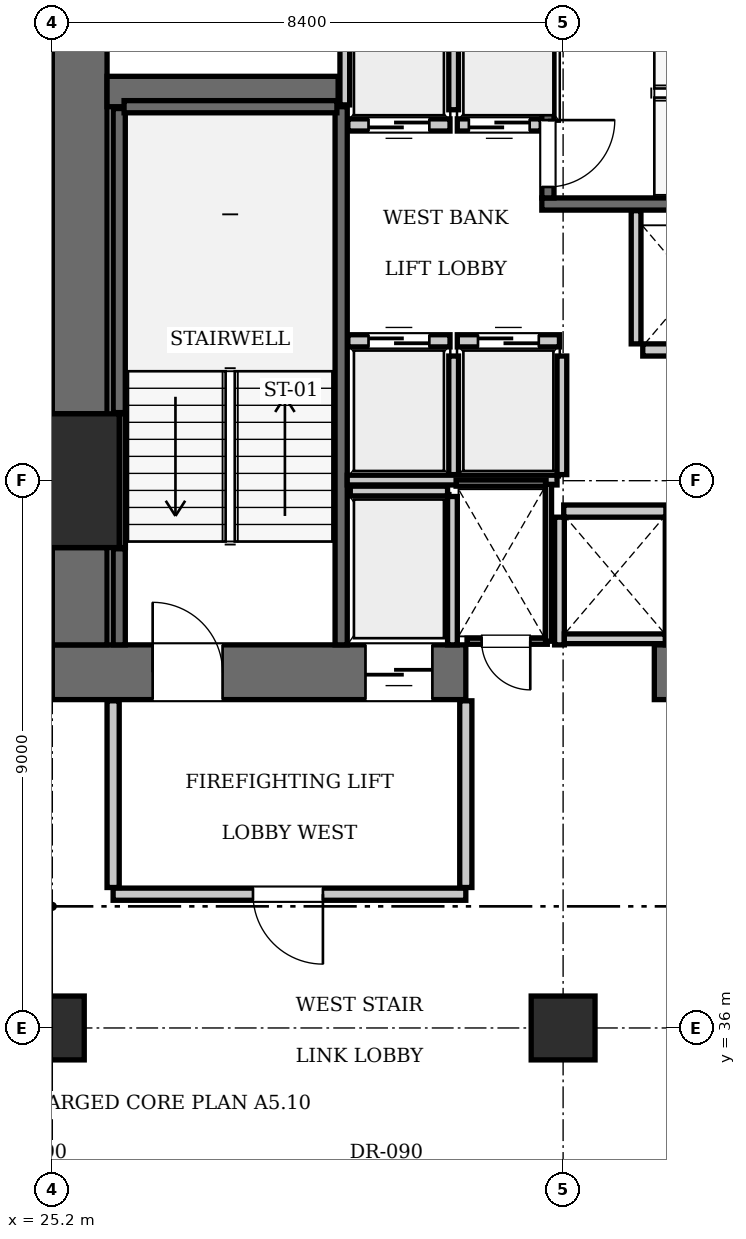
"""IFC4 building model, lengths in metres.
Left out: names, types, materials, properties, quantities, classifications, styles, units other than length and angle.
Written with IfcOpenShell. Run it as: python <this file> out.ifc"""

import sys

from ifc_helpers import new_model, si_unit, direction, frame, frame_2d, origin, origin_2d, place, context, subcontext, project, spatial, rectangle, extrude, element, fill, save


model = new_model("IFC4")
c1 = context("Model", 3, precision=1e-05, world=origin(), true_north=direction((0.0, 1.0)))
c2 = subcontext(c1, "Body", "Model", "MODEL_VIEW")
j1 = project(units=[si_unit("LENGTHUNIT", "METRE"), si_unit("PLANEANGLEUNIT", "RADIAN")], contexts=[c1])
p1 = place(None, origin())
s1 = spatial("IfcSite", under=j1, at=p1, CompositionType="ELEMENT")
p2 = place(p1, origin())
s2 = spatial("IfcBuilding", under=s1, at=p2, CompositionType="ELEMENT")
p3 = place(p2, frame((0.0, 0.0, 69.3)))
s3 = spatial("IfcBuildingStorey", under=s2, at=p3, CompositionType="ELEMENT", Elevation=69.3)
p4 = place(p3, frame((25.2, 45.0, 0.0), z_axis=(0.0, 0.0, 1.0), x_axis=(1.0, 0.0, 0.0)))
e1 = element("IfcColumn", 1, at=p4, inside=s3, PredefinedType="COLUMN", context=c2, shape_type="SweptSolid", body=[
    extrude(rectangle(XDim=2.2, YDim=2.2, at=origin_2d()), origin(), (0.0, 0.0, 1.0), 3.85),
])
p5 = place(p3, frame((25.2, 41.85, 0.0), z_axis=(0.0, 0.0, 1.0), x_axis=(1.0, 0.0, 0.0)))
e2 = element("IfcWall", 2, at=p5, inside=s3, PredefinedType="SHEAR", context=c2, shape_type="SweptSolid", body=[
    extrude(rectangle(XDim=6.8, YDim=0.9, at=frame_2d((3.4, 0.0))), origin(), (0.0, 0.0, 1.0), 3.85),
])
p6 = place(p5, frame((1.65, 0.0, 0.0)))
e3 = element("IfcOpeningElement", 3, at=p6, cuts=e2, PredefinedType="OPENING", context=c2, shape_type="SweptSolid", body=[
    extrude(rectangle(XDim=1.15, YDim=2.15, at=frame_2d((0.575, 1.075))), frame((0.0, 0.46, 0.0), z_axis=(0.0, -1.0, 0.0), x_axis=(1.0, 0.0, 0.0)), (0.0, 0.0, 1.0), 0.92),
])
p7 = place(p5, frame((5.15, 0.0, 0.0)))
e4 = element("IfcOpeningElement", 4, at=p7, cuts=e2, PredefinedType="OPENING", context=c2, shape_type="SweptSolid", body=[
    extrude(rectangle(XDim=1.1, YDim=2.2, at=frame_2d((0.55, 1.1))), frame((0.0, 0.46, 0.0), z_axis=(0.0, -1.0, 0.0), x_axis=(1.0, 0.0, 0.0)), (0.0, 0.0, 1.0), 0.92),
])
p8 = place(p3, frame((35.1, 41.85, 0.0), z_axis=(0.0, 0.0, 1.0), x_axis=(1.0, 0.0, 0.0)))
e5 = element("IfcWall", 5, at=p8, inside=s3, PredefinedType="SHEAR", context=c2, shape_type="SweptSolid", body=[
    extrude(rectangle(XDim=5.4, YDim=0.9, at=frame_2d((2.7, 0.0))), origin(), (0.0, 0.0, 1.0), 3.85),
])
p9 = place(p3, frame((25.65, 42.3, 0.0), z_axis=(0.0, 0.0, 1.0), x_axis=(0.0, 1.0, 0.0)))
e6 = element("IfcWall", 6, at=p9, inside=s3, PredefinedType="SHEAR", context=c2, shape_type="SweptSolid", body=[
    extrude(rectangle(XDim=1.6, YDim=0.9, at=frame_2d((0.8, 0.0))), origin(), (0.0, 0.0, 1.0), 3.85),
])
p10 = place(p3, frame((25.65, 46.1, 0.0), z_axis=(0.0, 0.0, 1.0), x_axis=(0.0, 1.0, 0.0)))
e7 = element("IfcWall", 7, at=p10, inside=s3, PredefinedType="SHEAR", context=c2, shape_type="SweptSolid", body=[
    extrude(rectangle(XDim=7.0, YDim=0.9, at=frame_2d((3.5, 0.0))), origin(), (0.0, 0.0, 1.0), 3.85),
])
p11 = place(p3, frame((26.1, 51.4, 0.0), z_axis=(0.0, 0.0, 1.0), x_axis=(1.0, 0.0, 0.0)))
e8 = element("IfcWall", 8, at=p11, inside=s3, PredefinedType="SHEAR", context=c2, shape_type="SweptSolid", body=[
    extrude(rectangle(XDim=3.8, YDim=0.5, at=frame_2d((1.9, 0.0))), origin(), (0.0, 0.0, 1.0), 3.85),
])
for number, where, z_axis, x_axis in (
    (9, (25.2, 36.0, 0.0), (0.0, 0.0, 1.0), (1.0, 0.0, 0.0)),
    (10, (33.6, 36.0, 0.0), (0.0, 0.0, 1.0), (1.0, 0.0, 0.0)),
):
    element("IfcColumn", number, at=place(p3, frame(where, z_axis=z_axis, x_axis=x_axis)), inside=s3, PredefinedType="COLUMN", context=c2, shape_type="SweptSolid", body=[
        extrude(rectangle(XDim=1.05, YDim=1.05, at=origin_2d()), origin(), (0.0, 0.0, 1.0), 3.85),
    ])
p12 = place(p3, frame((29.95, 42.3, 0.0), z_axis=(0.0, 0.0, 1.0), x_axis=(0.0, 1.0, 0.0)))
e11 = element("IfcWall", 11, at=p12, inside=s3, PredefinedType="SOLIDWALL", context=c2, shape_type="SweptSolid", body=[
    extrude(rectangle(XDim=8.85, YDim=0.2, at=frame_2d((4.425, 0.0))), origin(), (0.0, 0.0, 1.0), 3.61),
])
p13 = place(p3, frame((26.3, 42.3, 0.0), z_axis=(0.0, 0.0, 1.0), x_axis=(0.0, 1.0, 0.0)))
e12 = element("IfcWall", 12, at=p13, inside=s3, PredefinedType="SOLIDWALL", context=c2, shape_type="SweptSolid", body=[
    extrude(rectangle(XDim=1.58, YDim=0.2, at=frame_2d((0.79, 0.0))), origin(), (0.0, 0.0, 1.0), 3.61),
])
p14 = place(p3, frame((26.3, 46.12, 0.0), z_axis=(0.0, 0.0, 1.0), x_axis=(0.0, 1.0, 0.0)))
e13 = element("IfcWall", 13, at=p14, inside=s3, PredefinedType="SOLIDWALL", context=c2, shape_type="SweptSolid", body=[
    extrude(rectangle(XDim=5.0, YDim=0.2, at=frame_2d((2.5, 0.0))), origin(), (0.0, 0.0, 1.0), 3.61),
])
p15 = place(p3, frame((26.38, 51.15, 0.0), z_axis=(0.0, 0.0, 1.0), x_axis=(1.0, 0.0, 0.0)))
e14 = element("IfcWall", 14, at=p15, inside=s3, PredefinedType="SOLIDWALL", context=c2, shape_type="SweptSolid", body=[
    extrude(rectangle(XDim=3.5, YDim=0.2, at=frame_2d((1.75, 0.0))), origin(), (0.0, 0.0, 1.0), 3.61),
])
p16 = place(p3, frame((26.352, 43.9, 0.0), z_axis=(0.0, 0.0, 1.0), x_axis=(0.0, 1.0, 0.0)))
e15 = element("IfcWall", 15, at=p16, inside=s3, PredefinedType="SOLIDWALL", context=c2, shape_type="SweptSolid", body=[
    extrude(rectangle(XDim=2.2, YDim=0.1, at=frame_2d((1.1, 0.0))), origin(), (0.0, 0.0, 1.0), 3.61),
])
p17 = place(p3, frame((33.25, 49.55, 0.0), z_axis=(0.0, 0.0, 1.0), x_axis=(1.0, 0.0, 0.0)))
e16 = element("IfcWall", 16, at=p17, inside=s3, PredefinedType="SOLIDWALL", context=c2, shape_type="SweptSolid", body=[
    extrude(rectangle(XDim=9.1, YDim=0.2, at=frame_2d((4.55, 0.0))), origin(), (0.0, 0.0, 1.0), 3.61),
])
p18 = place(p3, frame((33.35, 49.65, 0.0), z_axis=(0.0, 0.0, 1.0), x_axis=(0.0, 1.0, 0.0)))
e17 = element("IfcWall", 17, at=p18, inside=s3, PredefinedType="SOLIDWALL", context=c2, shape_type="SweptSolid", body=[
    extrude(rectangle(XDim=3.45, YDim=0.2, at=frame_2d((1.725, 0.0))), origin(), (0.0, 0.0, 1.0), 3.61),
])
p19 = place(p18, frame((0.18, 0.0, 0.0)))
e18 = element("IfcOpeningElement", 18, at=p19, cuts=e17, PredefinedType="OPENING", context=c2, shape_type="SweptSolid", body=[
    extrude(rectangle(XDim=1.1, YDim=2.15, at=frame_2d((0.55, 1.075))), frame((0.0, 0.11, 0.0), z_axis=(0.0, -1.0, 0.0), x_axis=(1.0, 0.0, 0.0)), (0.0, 0.0, 1.0), 0.22),
])
p20 = place(p3, frame((30.06, 47.3, 0.0), z_axis=(0.0, 0.0, 1.0), x_axis=(1.0, 0.0, 0.0)))
e19 = element("IfcWall", 19, at=p20, inside=s3, PredefinedType="SOLIDWALL", context=c2, shape_type="SweptSolid", body=[
    extrude(rectangle(XDim=1.68, YDim=0.2, at=frame_2d((0.84, 0.0))), origin(), (0.0, 0.0, 1.0), 3.61),
])
p21 = place(p20, frame((0.34, 0.0, 0.0)))
e20 = element("IfcOpeningElement", 20, at=p21, cuts=e19, PredefinedType="OPENING", context=c2, shape_type="SweptSolid", body=[
    extrude(rectangle(XDim=1.0, YDim=2.15, at=frame_2d((0.5, 1.075))), frame((0.0, 0.11, 0.0), z_axis=(0.0, -1.0, 0.0), x_axis=(1.0, 0.0, 0.0)), (0.0, 0.0, 1.0), 0.22),
])
p22 = place(p3, frame((31.86, 47.3, 0.0), z_axis=(0.0, 0.0, 1.0), x_axis=(1.0, 0.0, 0.0)))
e21 = element("IfcWall", 21, at=p22, inside=s3, PredefinedType="SOLIDWALL", context=c2, shape_type="SweptSolid", body=[
    extrude(rectangle(XDim=1.68, YDim=0.2, at=frame_2d((0.84, 0.0))), origin(), (0.0, 0.0, 1.0), 3.61),
])
p23 = place(p22, frame((0.34, 0.0, 0.0)))
e22 = element("IfcOpeningElement", 22, at=p23, cuts=e21, PredefinedType="OPENING", context=c2, shape_type="SweptSolid", body=[
    extrude(rectangle(XDim=1.0, YDim=2.15, at=frame_2d((0.5, 1.075))), frame((0.0, 0.11, 0.0), z_axis=(0.0, -1.0, 0.0), x_axis=(1.0, 0.0, 0.0)), (0.0, 0.0, 1.0), 0.22),
])
p24 = place(p3, frame((30.06, 50.85, 0.0), z_axis=(0.0, 0.0, 1.0), x_axis=(1.0, 0.0, 0.0)))
e23 = element("IfcWall", 23, at=p24, inside=s3, PredefinedType="SOLIDWALL", context=c2, shape_type="SweptSolid", body=[
    extrude(rectangle(XDim=1.68, YDim=0.2, at=frame_2d((0.84, 0.0))), origin(), (0.0, 0.0, 1.0), 3.61),
])
p25 = place(p24, frame((0.34, 0.0, 0.0)))
e24 = element("IfcOpeningElement", 24, at=p25, cuts=e23, PredefinedType="OPENING", context=c2, shape_type="SweptSolid", body=[
    extrude(rectangle(XDim=1.0, YDim=2.15, at=frame_2d((0.5, 1.075))), frame((0.0, 0.11, 0.0), z_axis=(0.0, -1.0, 0.0), x_axis=(1.0, 0.0, 0.0)), (0.0, 0.0, 1.0), 0.22),
])
p26 = place(p3, frame((31.86, 50.85, 0.0), z_axis=(0.0, 0.0, 1.0), x_axis=(1.0, 0.0, 0.0)))
e25 = element("IfcWall", 25, at=p26, inside=s3, PredefinedType="SOLIDWALL", context=c2, shape_type="SweptSolid", body=[
    extrude(rectangle(XDim=1.38, YDim=0.2, at=frame_2d((0.69, 0.0))), origin(), (0.0, 0.0, 1.0), 3.61),
])
p27 = place(p26, frame((0.19, 0.0, 0.0)))
e26 = element("IfcOpeningElement", 26, at=p27, cuts=e25, PredefinedType="OPENING", context=c2, shape_type="SweptSolid", body=[
    extrude(rectangle(XDim=1.0, YDim=2.15, at=frame_2d((0.5, 1.075))), frame((0.0, 0.11, 0.0), z_axis=(0.0, -1.0, 0.0), x_axis=(1.0, 0.0, 0.0)), (0.0, 0.0, 1.0), 0.22),
])
p28 = place(p3, frame((34.91, 47.15, 0.0), z_axis=(0.0, 0.0, 1.0), x_axis=(1.0, 0.0, 0.0)))
e27 = element("IfcWall", 27, at=p28, inside=s3, PredefinedType="SOLIDWALL", context=c2, shape_type="SweptSolid", body=[
    extrude(rectangle(XDim=1.68, YDim=0.2, at=frame_2d((0.84, 0.0))), origin(), (0.0, 0.0, 1.0), 3.61),
])
p29 = place(p3, frame((33.61, 44.5, 0.0), z_axis=(0.0, 0.0, 1.0), x_axis=(1.0, 0.0, 0.0)))
e28 = element("IfcWall", 28, at=p29, inside=s3, PredefinedType="SOLIDWALL", context=c2, shape_type="SweptSolid", body=[
    extrude(rectangle(XDim=1.68, YDim=0.2, at=frame_2d((0.84, 0.0))), origin(), (0.0, 0.0, 1.0), 3.61),
])
p30 = place(p3, frame((30.1, 44.83, 0.0), z_axis=(0.0, 0.0, 1.0), x_axis=(1.0, 0.0, 0.0)))
e29 = element("IfcWall", 29, at=p30, inside=s3, PredefinedType="SOLIDWALL", context=c2, shape_type="SweptSolid", body=[
    extrude(rectangle(XDim=1.6, YDim=0.16, at=frame_2d((0.8, 0.0))), origin(), (0.0, 0.0, 1.0), 3.61),
])
p31 = place(p3, frame((31.78, 42.3, 0.0), z_axis=(0.0, 0.0, 1.0), x_axis=(0.0, 1.0, 0.0)))
e30 = element("IfcWall", 30, at=p31, inside=s3, PredefinedType="SOLIDWALL", context=c2, shape_type="SweptSolid", body=[
    extrude(rectangle(XDim=2.44, YDim=0.16, at=frame_2d((1.22, 0.0))), origin(), (0.0, 0.0, 1.0), 3.61),
])
for number, where, z_axis, x_axis in (
    (31, (31.8, 45.1, 0.0), (0.0, 0.0, 1.0), (0.0, 1.0, 0.0)),
    (32, (33.58, 45.1, 0.0), (0.0, 0.0, 1.0), (0.0, 1.0, 0.0)),
):
    element("IfcWall", number, at=place(p3, frame(where, z_axis=z_axis, x_axis=x_axis)), inside=s3, PredefinedType="SOLIDWALL", context=c2, shape_type="SweptSolid", body=[
        extrude(rectangle(XDim=1.95, YDim=0.16, at=frame_2d((0.975, 0.0))), origin(), (0.0, 0.0, 1.0), 3.61),
    ])
p32 = place(p3, frame((30.05, 45.01, 0.0), z_axis=(0.0, 0.0, 1.0), x_axis=(1.0, 0.0, 0.0)))
e33 = element("IfcWall", 33, at=p32, inside=s3, PredefinedType="SOLIDWALL", context=c2, shape_type="SweptSolid", body=[
    extrude(rectangle(XDim=3.45, YDim=0.16, at=frame_2d((1.725, 0.0))), origin(), (0.0, 0.0, 1.0), 3.61),
])
p33 = place(p3, frame((30.01, 51.18, 0.0), z_axis=(0.0, 0.0, 1.0), x_axis=(0.0, 1.0, 0.0)))
e34 = element("IfcWall", 34, at=p33, inside=s3, PredefinedType="SOLIDWALL", context=c2, shape_type="SweptSolid", body=[
    extrude(rectangle(XDim=1.92, YDim=0.16, at=frame_2d((0.96, 0.0))), origin(), (0.0, 0.0, 1.0), 3.61),
])
p34 = place(p3, frame((31.8, 51.1, 0.0), z_axis=(0.0, 0.0, 1.0), x_axis=(0.0, 1.0, 0.0)))
e35 = element("IfcWall", 35, at=p34, inside=s3, PredefinedType="SOLIDWALL", context=c2, shape_type="SweptSolid", body=[
    extrude(rectangle(XDim=2.0, YDim=0.16, at=frame_2d((1.0, 0.0))), origin(), (0.0, 0.0, 1.0), 3.61),
])
p35 = place(p3, frame((34.8, 47.25, 0.0), z_axis=(0.0, 0.0, 1.0), x_axis=(0.0, 1.0, 0.0)))
e36 = element("IfcWall", 36, at=p35, inside=s3, PredefinedType="SOLIDWALL", context=c2, shape_type="SweptSolid", body=[
    extrude(rectangle(XDim=2.19, YDim=0.16, at=frame_2d((1.095, 0.0))), origin(), (0.0, 0.0, 1.0), 3.61),
])
for number, where, z_axis, x_axis in (
    (37, (33.54, 42.3, 0.0), (0.0, 0.0, 1.0), (0.0, 1.0, 0.0)),
    (38, (35.36, 42.3, 0.0), (0.0, 0.0, 1.0), (0.0, 1.0, 0.0)),
):
    element("IfcWall", number, at=place(p3, frame(where, z_axis=z_axis, x_axis=x_axis)), inside=s3, PredefinedType="SOLIDWALL", context=c2, shape_type="SweptSolid", body=[
        extrude(rectangle(XDim=2.1, YDim=0.16, at=frame_2d((1.05, 0.0))), origin(), (0.0, 0.0, 1.0), 3.61),
    ])
p36 = place(p3, frame((33.62, 42.4, 0.0), z_axis=(0.0, 0.0, 1.0), x_axis=(1.0, 0.0, 0.0)))
e39 = element("IfcWall", 39, at=p36, inside=s3, PredefinedType="SOLIDWALL", context=c2, shape_type="SweptSolid", body=[
    extrude(rectangle(XDim=1.66, YDim=0.16, at=frame_2d((0.83, 0.0))), origin(), (0.0, 0.0, 1.0), 3.61),
])
p37 = place(p3, frame((26.2, 38.2, 0.0), z_axis=(0.0, 0.0, 1.0), x_axis=(1.0, 0.0, 0.0)))
e40 = element("IfcWall", 40, at=p37, inside=s3, PredefinedType="PARTITIONING", context=c2, shape_type="SweptSolid", body=[
    extrude(rectangle(XDim=5.8, YDim=0.2, at=frame_2d((2.9, 0.0))), origin(), (0.0, 0.0, 1.0), 3.61),
])
p38 = place(p37, frame((2.3, 0.0, 0.0)))
e41 = element("IfcOpeningElement", 41, at=p38, cuts=e40, PredefinedType="OPENING", context=c2, shape_type="SweptSolid", body=[
    extrude(rectangle(XDim=1.15, YDim=2.15, at=frame_2d((0.575, 1.075))), frame((0.0, 0.11, 0.0), z_axis=(0.0, -1.0, 0.0), x_axis=(1.0, 0.0, 0.0)), (0.0, 0.0, 1.0), 0.22),
])
for number, where, z_axis, x_axis in (
    (42, (26.2, 38.31, 0.0), (0.0, 0.0, 1.0), (0.0, 1.0, 0.0)),
    (43, (32.0, 38.31, 0.0), (0.0, 0.0, 1.0), (0.0, 1.0, 0.0)),
):
    element("IfcWall", number, at=place(p3, frame(where, z_axis=z_axis, x_axis=x_axis)), inside=s3, PredefinedType="PARTITIONING", context=c2, shape_type="SweptSolid", body=[
        extrude(rectangle(XDim=3.07, YDim=0.2, at=frame_2d((1.535, 0.0))), origin(), (0.0, 0.0, 1.0), 3.61),
    ])
p39 = place(p3, frame((32.02, 42.36, 0.0), z_axis=(0.0, 0.0, 1.0), x_axis=(1.0, 0.0, 0.0)))
e44 = element("IfcWall", 44, at=p39, inside=s3, PredefinedType="PARTITIONING", context=c2, shape_type="SweptSolid", body=[
    extrude(rectangle(XDim=1.32, YDim=0.1, at=frame_2d((0.66, 0.0))), origin(), (0.0, 0.0, 1.0), 3.61),
])
p40 = place(p39, frame((0.24, 0.0, 0.0)))
e45 = element("IfcOpeningElement", 45, at=p40, cuts=e44, PredefinedType="OPENING", context=c2, shape_type="SweptSolid", body=[
    extrude(rectangle(XDim=0.8, YDim=2.05, at=frame_2d((0.4, 1.025))), frame((0.0, 0.06, 0.0), z_axis=(0.0, -1.0, 0.0), x_axis=(1.0, 0.0, 0.0)), (0.0, 0.0, 1.0), 0.12),
])
p41 = place(p3, frame((31.84, 44.96, 0.0), z_axis=(0.0, 0.0, 1.0), x_axis=(1.0, 0.0, 0.0)))
e46 = element("IfcWall", 46, at=p41, inside=s3, PredefinedType="PARTITIONING", context=c2, shape_type="SweptSolid", body=[
    extrude(rectangle(XDim=1.48, YDim=0.1, at=frame_2d((0.74, 0.0))), origin(), (0.0, 0.0, 1.0), 3.61),
])
p42 = place(p3, frame((33.36, 42.36, 0.0), z_axis=(0.0, 0.0, 1.0), x_axis=(0.0, 1.0, 0.0)))
e47 = element("IfcWall", 47, at=p42, inside=s3, PredefinedType="PARTITIONING", context=c2, shape_type="SweptSolid", body=[
    extrude(rectangle(XDim=2.58, YDim=0.1, at=frame_2d((1.29, 0.0))), origin(), (0.0, 0.0, 1.0), 3.61),
])
p43 = place(p6, origin())
e48 = element("IfcDoor", 48, at=p43, inside=s3, OperationType="SINGLE_SWING_LEFT", PredefinedType="DOOR", context=c2, shape_type="SweptSolid", body=[
    extrude(rectangle(XDim=1.15, YDim=2.15, at=frame_2d((0.575, 1.075))), frame((0.0, 0.025, 0.0), z_axis=(0.0, -1.0, 0.0), x_axis=(1.0, 0.0, 0.0)), (0.0, 0.0, 1.0), 0.05),
])
fill(e3, e48)
p44 = place(p19, frame((1.1, 0.0, 0.0), z_axis=(0.0, 0.0, 1.0), x_axis=(-1.0, 0.0, 0.0)))
e49 = element("IfcDoor", 49, at=p44, inside=s3, OperationType="SINGLE_SWING_LEFT", PredefinedType="DOOR", context=c2, shape_type="SweptSolid", body=[
    extrude(rectangle(XDim=1.1, YDim=2.15, at=frame_2d((0.55, 1.075))), frame((0.0, 0.025, 0.0), z_axis=(0.0, -1.0, 0.0), x_axis=(1.0, 0.0, 0.0)), (0.0, 0.0, 1.0), 0.05),
])
fill(e18, e49)
p45 = place(p21, origin())
e50 = element("IfcDoor", 50, at=p45, inside=s3, OperationType="SLIDING_TO_LEFT", PredefinedType="DOOR", context=c2, shape_type="SweptSolid", body=[
    extrude(rectangle(XDim=1.0, YDim=2.15, at=frame_2d((0.5, 1.075))), frame((0.0, 0.025, 0.0), z_axis=(0.0, -1.0, 0.0), x_axis=(1.0, 0.0, 0.0)), (0.0, 0.0, 1.0), 0.05),
])
fill(e20, e50)
p46 = place(p23, origin())
e51 = element("IfcDoor", 51, at=p46, inside=s3, OperationType="SLIDING_TO_LEFT", PredefinedType="DOOR", context=c2, shape_type="SweptSolid", body=[
    extrude(rectangle(XDim=1.0, YDim=2.15, at=frame_2d((0.5, 1.075))), frame((0.0, 0.025, 0.0), z_axis=(0.0, -1.0, 0.0), x_axis=(1.0, 0.0, 0.0)), (0.0, 0.0, 1.0), 0.05),
])
fill(e22, e51)
p47 = place(p25, frame((1.0, 0.0, 0.0), z_axis=(0.0, 0.0, 1.0), x_axis=(-1.0, 0.0, 0.0)))
e52 = element("IfcDoor", 52, at=p47, inside=s3, OperationType="SLIDING_TO_LEFT", PredefinedType="DOOR", context=c2, shape_type="SweptSolid", body=[
    extrude(rectangle(XDim=1.0, YDim=2.15, at=frame_2d((0.5, 1.075))), frame((0.0, 0.025, 0.0), z_axis=(0.0, -1.0, 0.0), x_axis=(1.0, 0.0, 0.0)), (0.0, 0.0, 1.0), 0.05),
])
fill(e24, e52)
p48 = place(p27, frame((1.0, 0.0, 0.0), z_axis=(0.0, 0.0, 1.0), x_axis=(-1.0, 0.0, 0.0)))
e53 = element("IfcDoor", 53, at=p48, inside=s3, OperationType="SLIDING_TO_LEFT", PredefinedType="DOOR", context=c2, shape_type="SweptSolid", body=[
    extrude(rectangle(XDim=1.0, YDim=2.15, at=frame_2d((0.5, 1.075))), frame((0.0, 0.025, 0.0), z_axis=(0.0, -1.0, 0.0), x_axis=(1.0, 0.0, 0.0)), (0.0, 0.0, 1.0), 0.05),
])
fill(e26, e53)
p49 = place(p7, frame((1.1, 0.0, 0.0), z_axis=(0.0, 0.0, 1.0), x_axis=(-1.0, 0.0, 0.0)))
e54 = element("IfcDoor", 54, at=p49, inside=s3, OperationType="SLIDING_TO_LEFT", PredefinedType="DOOR", context=c2, shape_type="SweptSolid", body=[
    extrude(rectangle(XDim=1.1, YDim=2.2, at=frame_2d((0.55, 1.1))), frame((0.0, 0.025, 0.0), z_axis=(0.0, -1.0, 0.0), x_axis=(1.0, 0.0, 0.0)), (0.0, 0.0, 1.0), 0.05),
])
fill(e4, e54)
p50 = place(p38, frame((1.15, 0.0, 0.0), z_axis=(0.0, 0.0, 1.0), x_axis=(-1.0, 0.0, 0.0)))
e55 = element("IfcDoor", 55, at=p50, inside=s3, OperationType="SINGLE_SWING_LEFT", PredefinedType="DOOR", context=c2, shape_type="SweptSolid", body=[
    extrude(rectangle(XDim=1.15, YDim=2.15, at=frame_2d((0.575, 1.075))), frame((0.0, 0.025, 0.0), z_axis=(0.0, -1.0, 0.0), x_axis=(1.0, 0.0, 0.0)), (0.0, 0.0, 1.0), 0.05),
])
fill(e41, e55)
p51 = place(p40, frame((0.8, 0.0, 0.0), z_axis=(0.0, 0.0, 1.0), x_axis=(-1.0, 0.0, 0.0)))
e56 = element("IfcDoor", 56, at=p51, inside=s3, OperationType="SINGLE_SWING_LEFT", PredefinedType="DOOR", context=c2, shape_type="SweptSolid", body=[
    extrude(rectangle(XDim=0.8, YDim=2.05, at=frame_2d((0.4, 1.025))), frame((0.0, 0.025, 0.0), z_axis=(0.0, -1.0, 0.0), x_axis=(1.0, 0.0, 0.0)), (0.0, 0.0, 1.0), 0.05),
])
fill(e45, e56)
save(model, sys.argv[1])
